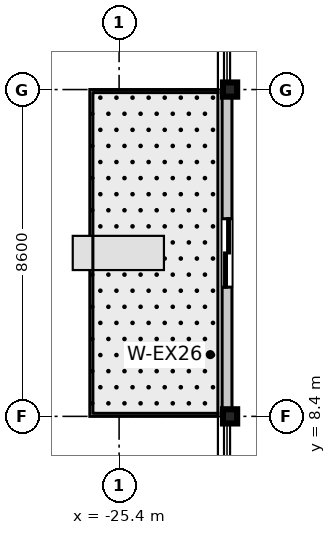
"""IFC4 building model, lengths in metres.
Left out: names, types, materials, properties, quantities, classifications, styles, units other than length and angle.
Written with IfcOpenShell. Run it as: python <this file> out.ifc"""

import sys

from ifc_helpers import new_model, si_unit, direction, frame, frame_2d, origin, origin_2d, place, context, subcontext, project, spatial, rectangle, i_section, extrude, source, transform, mapped, element, fill, save


model = new_model("IFC4")
c1 = context("Model", 3, precision=1e-05, world=origin(), true_north=direction((0.0, 1.0)))
c2 = subcontext(c1, "Body", "Model", "MODEL_VIEW")
j1 = project(units=[si_unit("LENGTHUNIT", "METRE"), si_unit("PLANEANGLEUNIT", "RADIAN")], contexts=[c1])
p1 = place(None, origin())
s1 = spatial("IfcSite", under=j1, at=p1, CompositionType="ELEMENT")
p2 = place(p1, origin())
s2 = spatial("IfcBuilding", under=s1, at=p2, CompositionType="ELEMENT")
p3 = place(p2, frame((0.0, 0.0, 304.2)))
s3 = spatial("IfcBuildingStorey", under=s2, at=p3, CompositionType="ELEMENT", Elevation=304.2)
m1 = source(origin(), c2, "Body", "SweptSolid", [
    extrude(i_section(OverallWidth=0.374, OverallDepth=0.374, WebThickness=0.014, FlangeThickness=0.023, at=origin_2d()), origin(), (0.0, 0.0, 1.0), 3.805),
])
for number, where, z_axis, x_axis in (
    (1, (-22.48, 8.4, 0.0), (0.0, 0.0, 1.0), (1.0, 0.0, 0.0)),
    (2, (-22.48, 17.0, 0.0), (0.0, 0.0, 1.0), (1.0, 0.0, 0.0)),
):
    element("IfcColumn", number, at=place(p3, frame(where, z_axis=z_axis, x_axis=x_axis)), inside=s3, PredefinedType="COLUMN", context=c2, shape_type="MappedRepresentation", body=[
        mapped(m1, transform((0.0, 0.0, 0.0), scale=1.0)),
    ])
m2 = source(origin(), c2, "Body", "SweptSolid", [
    extrude(rectangle(XDim=8.6, YDim=0.26, at=frame_2d((4.3, 0.0))), origin(), (0.0, 0.0, 1.0), 3.03),
])
p4 = place(p3, frame((-22.56, 8.4, 0.0), z_axis=(0.0, 0.0, 1.0), x_axis=(0.0, 1.0, 0.0)))
e3 = element("IfcWall", 3, at=p4, inside=s3, PredefinedType="STANDARD", context=c2, shape_type="MappedRepresentation", body=[
    mapped(m2, transform((0.0, 0.0, 0.0), scale=1.0)),
])
p5 = place(p4, frame((3.4, 0.0, 0.0)))
e4 = element("IfcOpeningElement", 4, at=p5, cuts=e3, PredefinedType="OPENING", context=c2, shape_type="SweptSolid", body=[
    extrude(rectangle(XDim=1.8, YDim=2.25, at=frame_2d((0.9, 1.125))), frame((0.0, 0.14, 0.0), z_axis=(0.0, -1.0, 0.0), x_axis=(1.0, 0.0, 0.0)), (0.0, 0.0, 1.0), 0.28),
])
m3 = source(origin(), c2, "Body", "SweptSolid", [
    extrude(rectangle(XDim=1.8, YDim=2.25, at=frame_2d((0.9, 1.125))), frame((0.0, 0.025, 0.0), z_axis=(0.0, -1.0, 0.0), x_axis=(1.0, 0.0, 0.0)), (0.0, 0.0, 1.0), 0.05),
])
p6 = place(p5, origin())
e5 = element("IfcDoor", 5, at=p6, inside=s3, OperationType="DOUBLE_DOOR_SLIDING", PredefinedType="DOOR", context=c2, shape_type="MappedRepresentation", body=[
    mapped(m3, transform((0.0, 0.0, 0.0), scale=1.0)),
])
fill(e4, e5)
save(model, sys.argv[1])
